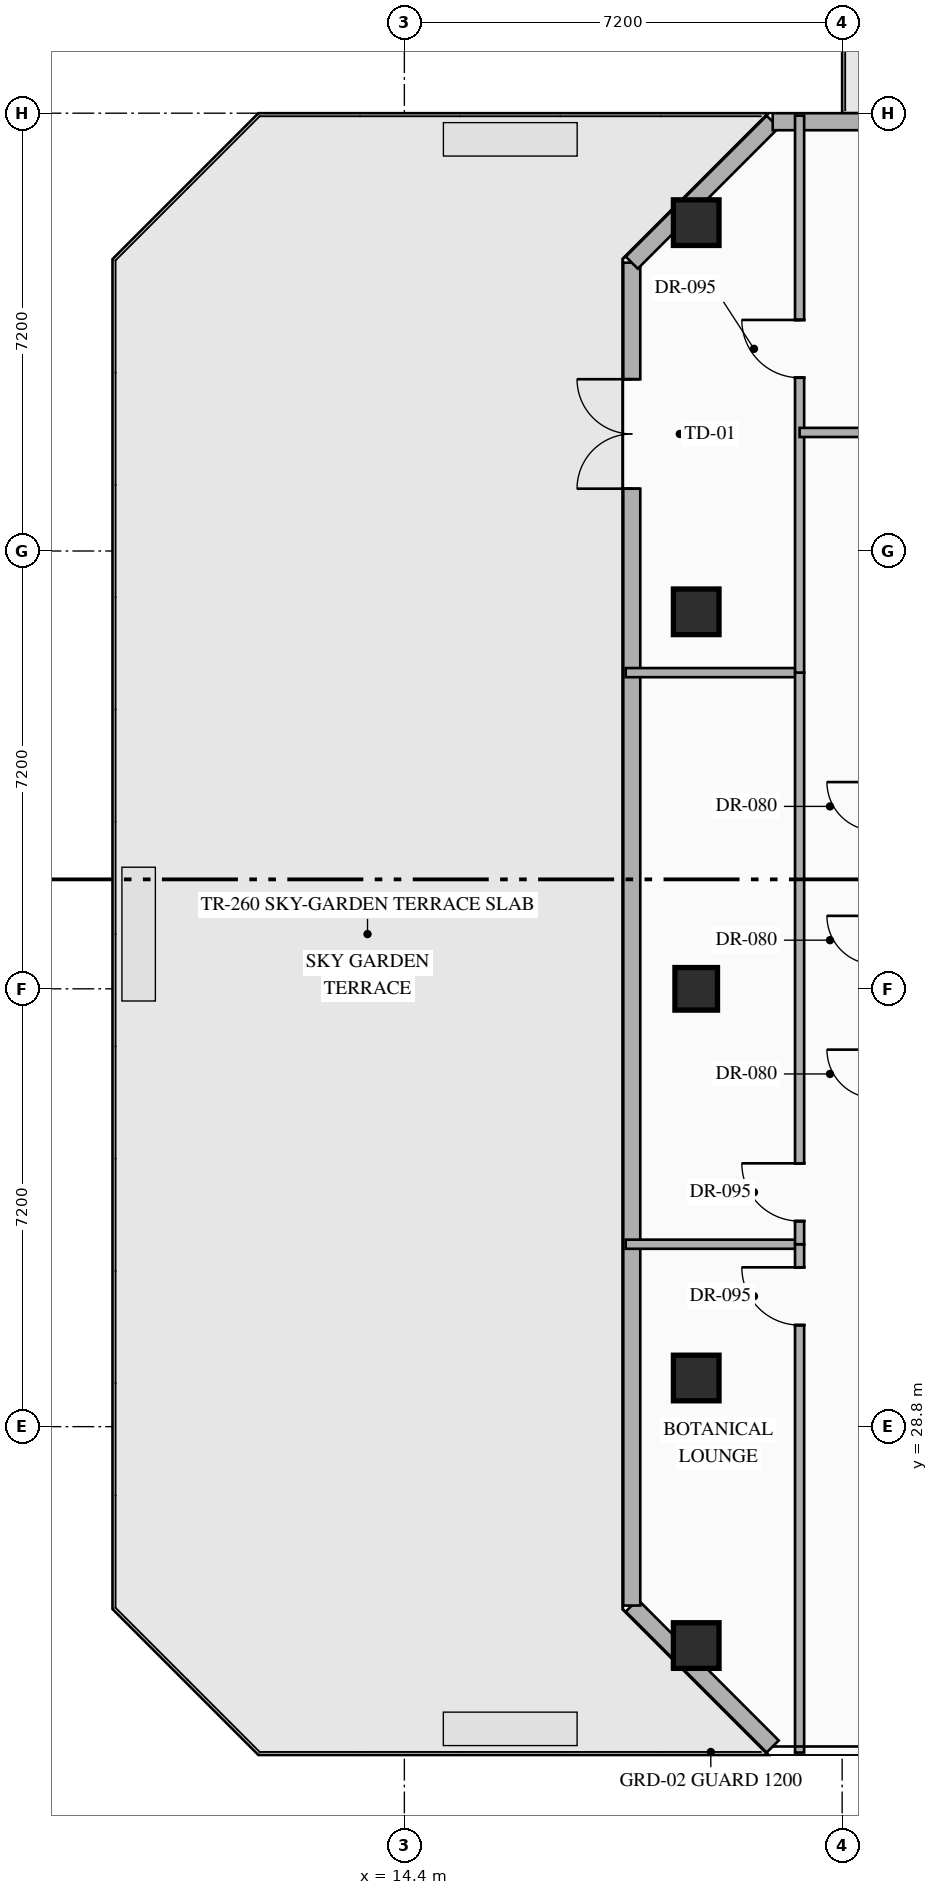
"""IFC4 building model, lengths in metres.
Left out: names, types, materials, properties, quantities, classifications, styles, units other than length and angle.
Written with IfcOpenShell. Run it as: python <this file> out.ifc"""

import sys

from ifc_helpers import new_model, si_unit, direction, frame, frame_2d, origin, origin_2d, place, context, subcontext, project, spatial, rectangle, hollow_rectangle, extrude, element, fill, save


model = new_model("IFC4")
c1 = context("Model", 3, precision=1e-05, world=origin(), true_north=direction((0.0, 1.0)))
c2 = subcontext(c1, "Body", "Model", "MODEL_VIEW")
j1 = project(units=[si_unit("LENGTHUNIT", "METRE"), si_unit("PLANEANGLEUNIT", "RADIAN")], contexts=[c1])
p1 = place(None, origin())
s1 = spatial("IfcSite", under=j1, at=p1, CompositionType="ELEMENT")
p2 = place(p1, origin())
s2 = spatial("IfcBuilding", under=s1, at=p2, CompositionType="ELEMENT")
p3 = place(p2, frame((0.0, 0.0, 186.75)))
s3 = spatial("IfcBuildingStorey", under=s2, at=p3, CompositionType="ELEMENT", Elevation=186.75)
for number, where, z_axis, x_axis in (
    (1, (19.2, 48.6, 0.0), (0.0, 0.0, 1.0), (1.0, 0.0, 0.0)),
    (2, (19.2, 25.2, 0.0), (0.0, 0.0, 1.0), (1.0, 0.0, 0.0)),
    (3, (19.2, 29.6, 0.0), (0.0, 0.0, 1.0), (1.0, 0.0, 0.0)),
    (4, (19.2, 42.2, 0.0), (0.0, 0.0, 1.0), (1.0, 0.0, 0.0)),
):
    element("IfcColumn", number, at=place(p3, frame(where, z_axis=z_axis, x_axis=x_axis)), inside=s3, PredefinedType="COLUMN", context=c2, shape_type="SweptSolid", body=[
        extrude(hollow_rectangle(XDim=0.75, YDim=0.75, WallThickness=0.028, at=origin_2d()), origin(), (0.0, 0.0, 1.0), 4.8),
    ])
p4 = place(p3, frame((19.2, 36.0, 0.0), z_axis=(0.0, 0.0, 1.0), x_axis=(1.0, 0.0, 0.0)))
e5 = element("IfcColumn", 5, at=p4, inside=s3, PredefinedType="COLUMN", context=c2, shape_type="SweptSolid", body=[
    extrude(hollow_rectangle(XDim=0.7, YDim=0.7, WallThickness=0.028, at=origin_2d()), origin(), (0.0, 0.0, 1.0), 4.8),
])
p5 = place(p3, frame((20.458, 23.54, 0.0), z_axis=(0.0, 0.0, 1.0), x_axis=(-0.707144017911, 0.707069542501, 0.0)))
e6 = element("IfcWall", 6, at=p5, inside=s3, PredefinedType="STANDARD", context=c2, shape_type="SweptSolid", body=[
    extrude(rectangle(XDim=3.278, YDim=0.28, at=frame_2d((1.639, 0.0))), origin(), (0.0, 0.0, 1.0), 4.55),
])
p6 = place(p3, frame((18.14, 25.858, 0.0), z_axis=(0.0, 0.0, 1.0), x_axis=(0.0, 1.0, 0.0)))
e7 = element("IfcWall", 7, at=p6, inside=s3, PredefinedType="STANDARD", context=c2, shape_type="SweptSolid", body=[
    extrude(rectangle(XDim=22.084, YDim=0.28, at=frame_2d((11.042, 0.0))), origin(), (0.0, 0.0, 1.0), 4.55),
])
p7 = place(p6, frame((18.367, 0.0, 0.0)))
e8 = element("IfcOpeningElement", 8, at=p7, cuts=e7, PredefinedType="OPENING", context=c2, shape_type="SweptSolid", body=[
    extrude(rectangle(XDim=1.8, YDim=2.25, at=frame_2d((0.9, 1.125))), frame((0.0, 0.15, 0.0), z_axis=(0.0, -1.0, 0.0), x_axis=(1.0, 0.0, 0.0)), (0.0, 0.0, 1.0), 0.3),
])
p8 = place(p3, frame((18.14, 47.942, 0.0), z_axis=(0.0, 0.0, 1.0), x_axis=(0.707106781187, 0.707106781187, 0.0)))
e9 = element("IfcWall", 9, at=p8, inside=s3, PredefinedType="STANDARD", context=c2, shape_type="SweptSolid", body=[
    extrude(rectangle(XDim=3.278, YDim=0.28, at=frame_2d((1.639, 0.0))), origin(), (0.0, 0.0, 1.0), 4.55),
])
p9 = place(p3, frame((20.458, 50.26, 0.0), z_axis=(0.0, 0.0, 1.0), x_axis=(1.0, 0.0, 0.0)))
e10 = element("IfcWall", 10, at=p9, inside=s3, PredefinedType="STANDARD", context=c2, shape_type="SweptSolid", body=[
    extrude(rectangle(XDim=22.084, YDim=0.28, at=frame_2d((11.042, 0.0))), origin(), (0.0, 0.0, 1.0), 4.55),
])
p10 = place(p9, frame((2.1, 0.0, 0.0)))
e11 = element("IfcOpeningElement", 11, at=p10, cuts=e10, PredefinedType="OPENING", context=c2, shape_type="SweptSolid", body=[
    extrude(rectangle(XDim=1.1, YDim=2.2, at=frame_2d((0.55, 1.1))), frame((0.0, 0.15, 0.0), z_axis=(0.0, -1.0, 0.0), x_axis=(1.0, 0.0, 0.0)), (0.0, 0.0, 1.0), 0.3),
])
p11 = place(p3, frame((18.04, 31.8, 0.0), z_axis=(0.0, 0.0, 1.0), x_axis=(1.0, 0.0, 0.0)))
e12 = element("IfcWall", 12, at=p11, inside=s3, PredefinedType="PARTITIONING", context=c2, shape_type="SweptSolid", body=[
    extrude(rectangle(XDim=2.86, YDim=0.15, at=frame_2d((1.43, 0.0))), origin(), (0.0, 0.0, 1.0), 4.55),
])
p12 = place(p3, frame((20.9, 23.44, 0.0), z_axis=(0.0, 0.0, 1.0), x_axis=(0.0, 1.0, 0.0)))
e13 = element("IfcWall", 13, at=p12, inside=s3, PredefinedType="PARTITIONING", context=c2, shape_type="SweptSolid", body=[
    extrude(rectangle(XDim=8.36, YDim=0.15, at=frame_2d((4.18, 0.0))), origin(), (0.0, 0.0, 1.0), 4.55),
])
p13 = place(p12, frame((7.03, 0.0, 0.0)))
e14 = element("IfcOpeningElement", 14, at=p13, cuts=e13, PredefinedType="OPENING", context=c2, shape_type="SweptSolid", body=[
    extrude(rectangle(XDim=0.95, YDim=2.15, at=frame_2d((0.475, 1.075))), frame((0.0, 0.085, 0.0), z_axis=(0.0, -1.0, 0.0), x_axis=(1.0, 0.0, 0.0)), (0.0, 0.0, 1.0), 0.17),
])
p14 = place(p3, frame((18.04, 41.2, 0.0), z_axis=(0.0, 0.0, 1.0), x_axis=(1.0, 0.0, 0.0)))
e15 = element("IfcWall", 15, at=p14, inside=s3, PredefinedType="PARTITIONING", context=c2, shape_type="SweptSolid", body=[
    extrude(rectangle(XDim=2.86, YDim=0.15, at=frame_2d((1.43, 0.0))), origin(), (0.0, 0.0, 1.0), 4.55),
])
p15 = place(p3, frame((20.9, 31.8, 0.0), z_axis=(0.0, 0.0, 1.0), x_axis=(0.0, 1.0, 0.0)))
e16 = element("IfcWall", 16, at=p15, inside=s3, PredefinedType="PARTITIONING", context=c2, shape_type="SweptSolid", body=[
    extrude(rectangle(XDim=9.4, YDim=0.15, at=frame_2d((4.7, 0.0))), origin(), (0.0, 0.0, 1.0), 4.55),
])
p16 = place(p15, frame((0.38, 0.0, 0.0)))
e17 = element("IfcOpeningElement", 17, at=p16, cuts=e16, PredefinedType="OPENING", context=c2, shape_type="SweptSolid", body=[
    extrude(rectangle(XDim=0.95, YDim=2.15, at=frame_2d((0.475, 1.075))), frame((0.0, 0.085, 0.0), z_axis=(0.0, -1.0, 0.0), x_axis=(1.0, 0.0, 0.0)), (0.0, 0.0, 1.0), 0.17),
])
p17 = place(p3, frame((20.9, 41.2, 0.0), z_axis=(0.0, 0.0, 1.0), x_axis=(0.0, 1.0, 0.0)))
e18 = element("IfcWall", 18, at=p17, inside=s3, PredefinedType="PARTITIONING", context=c2, shape_type="SweptSolid", body=[
    extrude(rectangle(XDim=9.16, YDim=0.15, at=frame_2d((4.58, 0.0))), origin(), (0.0, 0.0, 1.0), 4.55),
])
p18 = place(p17, frame((4.85, 0.0, 0.0)))
e19 = element("IfcOpeningElement", 19, at=p18, cuts=e18, PredefinedType="OPENING", context=c2, shape_type="SweptSolid", body=[
    extrude(rectangle(XDim=0.95, YDim=2.15, at=frame_2d((0.475, 1.075))), frame((0.0, 0.085, 0.0), z_axis=(0.0, -1.0, 0.0), x_axis=(1.0, 0.0, 0.0)), (0.0, 0.0, 1.0), 0.17),
])
p19 = place(p3, frame((20.9, 45.15, 0.0), z_axis=(0.0, 0.0, 1.0), x_axis=(1.0, 0.0, 0.0)))
e20 = element("IfcWall", 20, at=p19, inside=s3, PredefinedType="PARTITIONING", context=c2, shape_type="SweptSolid", body=[
    extrude(rectangle(XDim=8.9, YDim=0.15, at=frame_2d((4.45, 0.0))), origin(), (0.0, 0.0, 1.0), 4.55),
])
p20 = place(p19, frame((1.818, 0.0, 0.0)))
e21 = element("IfcOpeningElement", 21, at=p20, cuts=e20, PredefinedType="OPENING", context=c2, shape_type="SweptSolid", body=[
    extrude(rectangle(XDim=0.95, YDim=2.15, at=frame_2d((0.475, 1.075))), frame((0.0, 0.085, 0.0), z_axis=(0.0, -1.0, 0.0), x_axis=(1.0, 0.0, 0.0)), (0.0, 0.0, 1.0), 0.17),
])
p21 = place(p7, origin())
e22 = element("IfcDoor", 22, at=p21, inside=s3, OperationType="DOUBLE_DOOR_SINGLE_SWING", PredefinedType="DOOR", context=c2, shape_type="SweptSolid", body=[
    extrude(rectangle(XDim=1.8, YDim=2.25, at=frame_2d((0.9, 1.125))), frame((0.0, 0.025, 0.0), z_axis=(0.0, -1.0, 0.0), x_axis=(1.0, 0.0, 0.0)), (0.0, 0.0, 1.0), 0.05),
])
fill(e8, e22)
p22 = place(p13, origin())
e23 = element("IfcDoor", 23, at=p22, inside=s3, OperationType="SINGLE_SWING_RIGHT", PredefinedType="DOOR", context=c2, shape_type="SweptSolid", body=[
    extrude(rectangle(XDim=0.95, YDim=2.15, at=frame_2d((0.475, 1.075))), frame((0.0, 0.025, 0.0), z_axis=(0.0, -1.0, 0.0), x_axis=(1.0, 0.0, 0.0)), (0.0, 0.0, 1.0), 0.05),
])
fill(e14, e23)
p23 = place(p16, origin())
e24 = element("IfcDoor", 24, at=p23, inside=s3, OperationType="SINGLE_SWING_RIGHT", PredefinedType="DOOR", context=c2, shape_type="SweptSolid", body=[
    extrude(rectangle(XDim=0.95, YDim=2.15, at=frame_2d((0.475, 1.075))), frame((0.0, 0.025, 0.0), z_axis=(0.0, -1.0, 0.0), x_axis=(1.0, 0.0, 0.0)), (0.0, 0.0, 1.0), 0.05),
])
fill(e17, e24)
p24 = place(p18, origin())
e25 = element("IfcDoor", 25, at=p24, inside=s3, OperationType="SINGLE_SWING_RIGHT", PredefinedType="DOOR", context=c2, shape_type="SweptSolid", body=[
    extrude(rectangle(XDim=0.95, YDim=2.15, at=frame_2d((0.475, 1.075))), frame((0.0, 0.025, 0.0), z_axis=(0.0, -1.0, 0.0), x_axis=(1.0, 0.0, 0.0)), (0.0, 0.0, 1.0), 0.05),
])
fill(e19, e25)
save(model, sys.argv[1])
